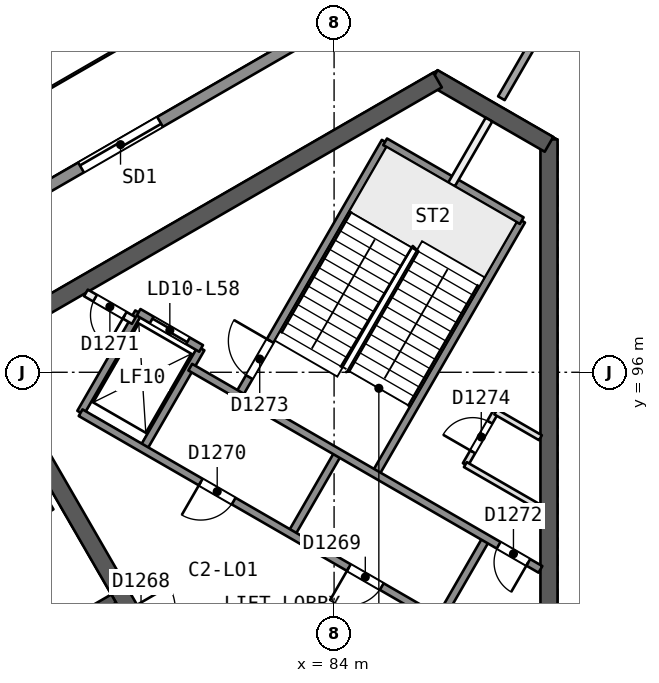
"""IFC4 building model, lengths in metres.
Left out: names, types, materials, properties, quantities, classifications, styles, units other than length and angle.
Written with IfcOpenShell. Run it as: python <this file> out.ifc"""

import sys

from ifc_helpers import new_model, si_unit, direction, frame, frame_2d, origin, place, context, subcontext, project, spatial, rectangle, extrude, element, fill, save


model = new_model("IFC4")
c1 = context("Model", 3, precision=1e-05, world=origin(), true_north=direction((0.0, 1.0)))
c2 = subcontext(c1, "Body", "Model", "MODEL_VIEW")
j1 = project(units=[si_unit("LENGTHUNIT", "METRE"), si_unit("PLANEANGLEUNIT", "RADIAN")], contexts=[c1])
p1 = place(None, origin())
s1 = spatial("IfcSite", under=j1, at=p1, CompositionType="ELEMENT")
p2 = place(p1, origin())
s2 = spatial("IfcBuilding", under=s1, at=p2, CompositionType="ELEMENT")
p3 = place(p2, frame((0.0, 0.0, 235.4)))
s3 = spatial("IfcBuildingStorey", under=s2, at=p3, CompositionType="ELEMENT", Elevation=235.4)
p4 = place(p3, frame((89.655, 88.019, 0.0), z_axis=(0.0, 0.0, 1.0), x_axis=(0.0, 1.0, 0.0)))
e1 = element("IfcWall", 1, at=p4, inside=s3, PredefinedType="SHEAR", context=c2, shape_type="SweptSolid", body=[
    extrude(rectangle(XDim=14.108, YDim=0.45, at=frame_2d((7.054, 0.0))), origin(), (0.0, 0.0, 1.0), 3.7),
])
p5 = place(p3, frame((89.655, 101.998, 0.0), z_axis=(0.0, 0.0, 1.0), x_axis=(-0.866042179588, 0.49997094233, 0.0)))
e2 = element("IfcWall", 2, at=p5, inside=s3, PredefinedType="SHEAR", context=c2, shape_type="SweptSolid", body=[
    extrude(rectangle(XDim=3.515, YDim=0.45, at=frame_2d((1.758, 0.0))), origin(), (0.0, 0.0, 1.0), 3.7),
])
p6 = place(p3, frame((86.723, 103.69, 0.0), z_axis=(0.0, 0.0, 1.0), x_axis=(-0.866022713978, -0.500004658852, 0.0)))
e3 = element("IfcWall", 3, at=p6, inside=s3, PredefinedType="SHEAR", context=c2, shape_type="SweptSolid", body=[
    extrude(rectangle(XDim=14.203, YDim=0.45, at=frame_2d((7.102, 0.0))), origin(), (0.0, 0.0, 1.0), 3.7),
])
p7 = place(p3, frame((74.617, 96.701, 0.0), z_axis=(0.0, 0.0, 1.0), x_axis=(0.499994385119, -0.866028645513, 0.0)))
e4 = element("IfcWall", 4, at=p7, inside=s3, PredefinedType="SHEAR", context=c2, shape_type="SweptSolid", body=[
    extrude(rectangle(XDim=10.155, YDim=0.45, at=frame_2d((5.077, 0.0))), origin(), (0.0, 0.0, 1.0), 3.7),
])
p8 = place(p7, frame((8.005, 0.0, 0.0)))
e5 = element("IfcOpeningElement", 5, at=p8, cuts=e4, PredefinedType="OPENING", context=c2, shape_type="SweptSolid", body=[
    extrude(rectangle(XDim=1.2, YDim=2.1, at=frame_2d((0.6, 1.05))), frame((0.0, 0.235, 0.0), z_axis=(0.0, -1.0, 0.0), x_axis=(1.0, 0.0, 0.0)), (0.0, 0.0, 1.0), 0.471),
])
p9 = place(p3, frame((78.2, 90.046, 0.0), z_axis=(0.0, 0.0, 1.0), x_axis=(-0.866026492143, -0.499998114903, 0.0)))
e6 = element("IfcWall", 6, at=p9, inside=s3, PredefinedType="SHEAR", context=c2, shape_type="SweptSolid", body=[
    extrude(rectangle(XDim=15.588, YDim=0.25, at=frame_2d((7.794, 0.0))), origin(), (0.0, 0.0, 1.0), 3.3),
])
p10 = place(p9, frame((3.294, 0.0, 0.0)))
e7 = element("IfcOpeningElement", 7, at=p10, cuts=e6, PredefinedType="OPENING", context=c2, shape_type="SweptSolid", body=[
    extrude(rectangle(XDim=1.0, YDim=2.1, at=frame_2d((0.5, 1.05))), frame((0.0, 0.135, 0.0), z_axis=(0.0, -1.0, 0.0), x_axis=(1.0, 0.0, 0.0)), (0.0, 0.0, 1.0), 0.271),
])
p11 = place(p9, frame((9.162, 0.0, 0.0)))
e8 = element("IfcOpeningElement", 8, at=p11, cuts=e6, PredefinedType="OPENING", context=c2, shape_type="SweptSolid", body=[
    extrude(rectangle(XDim=1.1, YDim=2.1, at=frame_2d((0.55, 1.05))), frame((0.0, 0.135, 0.0), z_axis=(0.0, -1.0, 0.0), x_axis=(1.0, 0.0, 0.0)), (0.0, 0.0, 1.0), 0.271),
])
p12 = place(p9, frame((11.762, 0.0, 0.0)))
e9 = element("IfcOpeningElement", 9, at=p12, cuts=e6, PredefinedType="OPENING", context=c2, shape_type="SweptSolid", body=[
    extrude(rectangle(XDim=1.0, YDim=2.1, at=frame_2d((0.5, 1.05))), frame((0.0, 0.135, 0.0), z_axis=(0.0, -1.0, 0.0), x_axis=(1.0, 0.0, 0.0)), (0.0, 0.0, 1.0), 0.271),
])
p13 = place(p3, frame((90.069, 106.098, 0.0), z_axis=(0.0, 0.0, 1.0), x_axis=(-0.500005547131, -0.866022201123, 0.0)))
e10 = element("IfcWall", 10, at=p13, inside=s3, PredefinedType="PARTITIONING", context=c2, shape_type="SweptSolid", body=[
    extrude(rectangle(XDim=3.334, YDim=0.2, at=frame_2d((1.667, 0.0))), origin(), (0.0, 0.0, 1.0), 3.3),
])
p14 = place(p3, frame((74.498, 91.257, 0.0), z_axis=(0.0, 0.0, 1.0), x_axis=(0.866038271014, 0.499977712642, 0.0)))
e11 = element("IfcWall", 11, at=p14, inside=s3, PredefinedType="PARTITIONING", context=c2, shape_type="SweptSolid", body=[
    extrude(rectangle(XDim=2.401, YDim=0.15, at=frame_2d((1.2, 0.0))), origin(), (0.0, 0.0, 1.0), 3.3),
])
p15 = place(p3, frame((44.715, 82.552, 0.0), z_axis=(0.0, 0.0, 1.0), x_axis=(0.866025334516, 0.500000119977, 0.0)))
e12 = element("IfcWall", 12, at=p15, inside=s3, PredefinedType="SOLIDWALL", context=c2, shape_type="SweptSolid", body=[
    extrude(rectangle(XDim=49.903, YDim=0.3, at=frame_2d((24.952, 0.0))), origin(), (0.0, 0.0, 1.0), 3.3),
])
p16 = place(p15, frame((23.284, 0.0, 0.0)))
e13 = element("IfcOpeningElement", 13, at=p16, cuts=e12, PredefinedType="OPENING", context=c2, shape_type="SweptSolid", body=[
    extrude(rectangle(XDim=2.4, YDim=2.4, at=frame_2d((1.2, 1.2))), frame((0.0, 0.161, 0.0), z_axis=(0.0, -1.0, 0.0), x_axis=(1.0, 0.0, 0.0)), (0.0, 0.0, 1.0), 0.321),
])
p17 = place(p15, frame((37.674, 0.0, 0.0)))
e14 = element("IfcOpeningElement", 14, at=p17, cuts=e12, PredefinedType="OPENING", context=c2, shape_type="SweptSolid", body=[
    extrude(rectangle(XDim=2.4, YDim=2.4, at=frame_2d((1.2, 1.2))), frame((0.0, 0.161, 0.0), z_axis=(0.0, -1.0, 0.0), x_axis=(1.0, 0.0, 0.0)), (0.0, 0.0, 1.0), 0.321),
])
p18 = place(p15, frame((9.362, 0.0, 0.0)))
e15 = element("IfcOpeningElement", 15, at=p18, cuts=e12, PredefinedType="OPENING", context=c2, shape_type="SweptSolid", body=[
    extrude(rectangle(XDim=2.4, YDim=2.4, at=frame_2d((1.2, 1.2))), frame((0.0, 0.161, 0.0), z_axis=(0.0, -1.0, 0.0), x_axis=(1.0, 0.0, 0.0)), (0.0, 0.0, 1.0), 0.321),
])
p19 = place(p3, frame((86.77, 89.486, 0.0), z_axis=(0.0, 0.0, 1.0), x_axis=(0.499961042966, 0.86604789447, 0.0)))
e16 = element("IfcWall", 16, at=p19, inside=s3, PredefinedType="SOLIDWALL", context=c2, shape_type="SweptSolid", body=[
    extrude(rectangle(XDim=2.48, YDim=0.2, at=frame_2d((1.24, 0.0))), origin(), (0.0, 0.0, 1.0), 3.3),
])
p20 = place(p3, frame((87.454, 93.571, 0.0), z_axis=(0.0, 0.0, 1.0), x_axis=(0.499995408039, 0.866028054938, 0.0)))
e17 = element("IfcWall", 17, at=p20, inside=s3, PredefinedType="PARTITIONING", context=c2, shape_type="SweptSolid", body=[
    extrude(rectangle(XDim=1.6, YDim=0.15, at=frame_2d((0.8, 0.0))), origin(), (0.0, 0.0, 1.0), 3.3),
])
p21 = place(p20, frame((0.387, 0.0, 0.0)))
e18 = element("IfcOpeningElement", 18, at=p21, cuts=e17, PredefinedType="OPENING", context=c2, shape_type="SweptSolid", body=[
    extrude(rectangle(XDim=0.9, YDim=2.1, at=frame_2d((0.45, 1.05))), frame((0.0, 0.085, 0.0), z_axis=(0.0, -1.0, 0.0), x_axis=(1.0, 0.0, 0.0)), (0.0, 0.0, 1.0), 0.171),
])
p22 = place(p3, frame((85.087, 93.321, 0.0), z_axis=(0.0, 0.0, 1.0), x_axis=(0.500019787375, 0.866013979237, 0.0)))
e19 = element("IfcWall", 19, at=p22, inside=s3, PredefinedType="SOLIDWALL", context=c2, shape_type="SweptSolid", body=[
    extrude(rectangle(XDim=7.7, YDim=0.2, at=frame_2d((3.85, 0.0))), origin(), (0.0, 0.0, 1.0), 3.3),
])
p23 = place(p3, frame((82.873, 91.736, 0.0), z_axis=(0.0, 0.0, 1.0), x_axis=(0.499961042966, 0.86604789447, 0.0)))
e20 = element("IfcWall", 20, at=p23, inside=s3, PredefinedType="SOLIDWALL", context=c2, shape_type="SweptSolid", body=[
    extrude(rectangle(XDim=2.48, YDim=0.2, at=frame_2d((1.24, 0.0))), origin(), (0.0, 0.0, 1.0), 3.3),
])
p24 = place(p3, frame((87.09, 100.94, 0.0), z_axis=(0.0, 0.0, 1.0), x_axis=(0.500011643316, 0.866018681408, 0.0)))
e21 = element("IfcWall", 21, at=p24, inside=s3, PredefinedType="PARTITIONING", context=c2, shape_type="SweptSolid", body=[
    extrude(rectangle(XDim=1.973, YDim=0.2, at=frame_2d((0.987, 0.0))), origin(), (0.0, 0.0, 1.0), 3.3),
])
p25 = place(p3, frame((81.493, 95.396, 0.0), z_axis=(0.0, 0.0, 1.0), x_axis=(0.500006057782, 0.866021906294, 0.0)))
e22 = element("IfcWall", 22, at=p25, inside=s3, PredefinedType="SOLIDWALL", context=c2, shape_type="SweptSolid", body=[
    extrude(rectangle(XDim=7.7, YDim=0.2, at=frame_2d((3.85, 0.0))), origin(), (0.0, 0.0, 1.0), 3.3),
])
p26 = place(p25, frame((0.55, 0.0, 0.0)))
e23 = element("IfcOpeningElement", 23, at=p26, cuts=e22, PredefinedType="OPENING", context=c2, shape_type="SweptSolid", body=[
    extrude(rectangle(XDim=1.1, YDim=2.1, at=frame_2d((0.55, 1.05))), frame((0.0, 0.11, 0.0), z_axis=(0.0, -1.0, 0.0), x_axis=(1.0, 0.0, 0.0)), (0.0, 0.0, 1.0), 0.221),
])
for number, where, z_axis, x_axis in (
    (24, (78.976, 93.986, 0.0), (0.0, 0.0, 1.0), (0.5, 0.866, 0.0)),
    (25, (77.33, 94.936, 0.0), (0.0, 0.0, 1.0), (0.5, 0.866, 0.0)),
):
    element("IfcWall", number, at=place(p3, frame(where, z_axis=z_axis, x_axis=x_axis)), inside=s3, PredefinedType="SOLIDWALL", context=c2, shape_type="SweptSolid", body=[
        extrude(rectangle(XDim=3.05, YDim=0.2, at=frame_2d((1.525, 0.0))), origin(), (0.0, 0.0, 1.0), 3.3),
    ])
p27 = place(p3, frame((86.77, 89.486, 0.0), z_axis=(0.0, 0.0, 1.0), x_axis=(-0.86601811187, 0.500012629753, 0.0)))
e26 = element("IfcWall", 26, at=p27, inside=s3, PredefinedType="SOLIDWALL", context=c2, shape_type="SweptSolid", body=[
    extrude(rectangle(XDim=10.9, YDim=0.2, at=frame_2d((5.45, 0.0))), origin(), (0.0, 0.0, 1.0), 3.3),
])
p28 = place(p27, frame((1.75, 0.0, 0.0)))
e27 = element("IfcOpeningElement", 27, at=p28, cuts=e26, PredefinedType="OPENING", context=c2, shape_type="SweptSolid", body=[
    extrude(rectangle(XDim=1.0, YDim=2.1, at=frame_2d((0.5, 1.05))), frame((0.0, 0.11, 0.0), z_axis=(0.0, -1.0, 0.0), x_axis=(1.0, 0.0, 0.0)), (0.0, 0.0, 1.0), 0.221),
])
p29 = place(p27, frame((6.25, 0.0, 0.0)))
e28 = element("IfcOpeningElement", 28, at=p29, cuts=e26, PredefinedType="OPENING", context=c2, shape_type="SweptSolid", body=[
    extrude(rectangle(XDim=1.0, YDim=2.1, at=frame_2d((0.5, 1.05))), frame((0.0, 0.11, 0.0), z_axis=(0.0, -1.0, 0.0), x_axis=(1.0, 0.0, 0.0)), (0.0, 0.0, 1.0), 0.221),
])
p30 = place(p3, frame((89.43, 90.814, 0.0), z_axis=(0.0, 0.0, 1.0), x_axis=(-0.866018983788, 0.500011119594, 0.0)))
e29 = element("IfcWall", 29, at=p30, inside=s3, PredefinedType="SOLIDWALL", context=c2, shape_type="SweptSolid", body=[
    extrude(rectangle(XDim=10.64, YDim=0.2, at=frame_2d((5.32, 0.0))), origin(), (0.0, 0.0, 1.0), 3.3),
])
p31 = place(p30, frame((0.37, 0.0, 0.0)))
e30 = element("IfcOpeningElement", 30, at=p31, cuts=e29, PredefinedType="OPENING", context=c2, shape_type="SweptSolid", body=[
    extrude(rectangle(XDim=0.9, YDim=2.1, at=frame_2d((0.45, 1.05))), frame((0.0, 0.11, 0.0), z_axis=(0.0, -1.0, 0.0), x_axis=(1.0, 0.0, 0.0)), (0.0, 0.0, 1.0), 0.221),
])
p32 = place(p3, frame((78.73, 97.361, 0.0), z_axis=(0.0, 0.0, 1.0), x_axis=(-0.866045896294, 0.499964504253, 0.0)))
e31 = element("IfcWall", 31, at=p32, inside=s3, PredefinedType="PARTITIONING", context=c2, shape_type="SweptSolid", body=[
    extrude(rectangle(XDim=1.455, YDim=0.2, at=frame_2d((0.728, 0.0))), origin(), (0.0, 0.0, 1.0), 3.3),
])
p33 = place(p32, frame((0.278, 0.0, 0.0)))
e32 = element("IfcOpeningElement", 32, at=p33, cuts=e31, PredefinedType="OPENING", context=c2, shape_type="SweptSolid", body=[
    extrude(rectangle(XDim=0.9, YDim=2.1, at=frame_2d((0.45, 1.05))), frame((0.0, 0.11, 0.0), z_axis=(0.0, -1.0, 0.0), x_axis=(1.0, 0.0, 0.0)), (0.0, 0.0, 1.0), 0.221),
])
p34 = place(p3, frame((80.5, 96.627, 0.0), z_axis=(0.0, 0.0, 1.0), x_axis=(-0.86601224135, 0.500022797313, 0.0)))
e33 = element("IfcWall", 33, at=p34, inside=s3, PredefinedType="SOLIDWALL", context=c2, shape_type="SweptSolid", body=[
    extrude(rectangle(XDim=1.9, YDim=0.2, at=frame_2d((0.95, 0.0))), origin(), (0.0, 0.0, 1.0), 3.3),
])
p35 = place(p34, frame((0.4, 0.0, 0.0)))
e34 = element("IfcOpeningElement", 34, at=p35, cuts=e33, PredefinedType="OPENING", context=c2, shape_type="SweptSolid", body=[
    extrude(rectangle(XDim=1.1, YDim=2.1, at=frame_2d((0.55, 1.05))), frame((0.0, 0.11, 0.0), z_axis=(0.0, -1.0, 0.0), x_axis=(1.0, 0.0, 0.0)), (0.0, 0.0, 1.0), 0.221),
])
p36 = place(p3, frame((89.43, 92.43, 0.0), z_axis=(0.0, 0.0, 1.0), x_axis=(-0.866048373726, 0.499960212783, 0.0)))
e35 = element("IfcWall", 35, at=p36, inside=s3, PredefinedType="PARTITIONING", context=c2, shape_type="SweptSolid", body=[
    extrude(rectangle(XDim=2.281, YDim=0.15, at=frame_2d((1.141, 0.0))), origin(), (0.0, 0.0, 1.0), 3.3),
])
p37 = place(p3, frame((89.43, 94.278, 0.0), z_axis=(0.0, 0.0, 1.0), x_axis=(-0.865987941628, 0.500064880745, 0.0)))
e36 = element("IfcWall", 36, at=p37, inside=s3, PredefinedType="PARTITIONING", context=c2, shape_type="SweptSolid", body=[
    extrude(rectangle(XDim=1.358, YDim=0.15, at=frame_2d((0.679, 0.0))), origin(), (0.0, 0.0, 1.0), 3.3),
])
p38 = place(p3, frame((88.937, 99.99, 0.0), z_axis=(0.0, 0.0, 1.0), x_axis=(-0.866004344652, 0.500036473714, 0.0)))
e37 = element("IfcWall", 37, at=p38, inside=s3, PredefinedType="SOLIDWALL", context=c2, shape_type="SweptSolid", body=[
    extrude(rectangle(XDim=4.15, YDim=0.2, at=frame_2d((2.075, 0.0))), origin(), (0.0, 0.0, 1.0), 3.3),
])
p39 = place(p17, origin())
e38 = element("IfcDoor", 38, at=p39, inside=s3, OperationType="SLIDING_TO_RIGHT", PredefinedType="NOTDEFINED", context=c2, shape_type="SweptSolid", body=[
    extrude(rectangle(XDim=2.4, YDim=2.4, at=frame_2d((1.2, 1.2))), frame((0.0, 0.025, 0.0), z_axis=(0.0, -1.0, 0.0), x_axis=(1.0, 0.0, 0.0)), (0.0, 0.0, 1.0), 0.05),
])
fill(e14, e38)
p40 = place(p35, origin())
e39 = element("IfcDoor", 39, at=p40, inside=s3, OperationType="SLIDING_TO_RIGHT", PredefinedType="NOTDEFINED", context=c2, shape_type="SweptSolid", body=[
    extrude(rectangle(XDim=1.1, YDim=2.1, at=frame_2d((0.55, 1.05))), frame((0.0, 0.025, 0.0), z_axis=(0.0, -1.0, 0.0), x_axis=(1.0, 0.0, 0.0)), (0.0, 0.0, 1.0), 0.05),
])
fill(e34, e39)
p41 = place(p28, origin())
e40 = element("IfcDoor", 40, at=p41, inside=s3, OperationType="SINGLE_SWING_RIGHT", PredefinedType="NOTDEFINED", context=c2, shape_type="SweptSolid", body=[
    extrude(rectangle(XDim=1.0, YDim=2.1, at=frame_2d((0.5, 1.05))), frame((0.0, 0.025, 0.0), z_axis=(0.0, -1.0, 0.0), x_axis=(1.0, 0.0, 0.0)), (0.0, 0.0, 1.0), 0.05),
])
fill(e27, e40)
p42 = place(p29, origin())
e41 = element("IfcDoor", 41, at=p42, inside=s3, OperationType="SINGLE_SWING_RIGHT", PredefinedType="NOTDEFINED", context=c2, shape_type="SweptSolid", body=[
    extrude(rectangle(XDim=1.0, YDim=2.1, at=frame_2d((0.5, 1.05))), frame((0.0, 0.025, 0.0), z_axis=(0.0, -1.0, 0.0), x_axis=(1.0, 0.0, 0.0)), (0.0, 0.0, 1.0), 0.05),
])
fill(e28, e41)
p43 = place(p33, origin())
e42 = element("IfcDoor", 42, at=p43, inside=s3, OperationType="SINGLE_SWING_LEFT", PredefinedType="NOTDEFINED", context=c2, shape_type="SweptSolid", body=[
    extrude(rectangle(XDim=0.9, YDim=2.1, at=frame_2d((0.45, 1.05))), frame((0.0, 0.025, 0.0), z_axis=(0.0, -1.0, 0.0), x_axis=(1.0, 0.0, 0.0)), (0.0, 0.0, 1.0), 0.05),
])
fill(e32, e42)
p44 = place(p31, origin())
e43 = element("IfcDoor", 43, at=p44, inside=s3, OperationType="SINGLE_SWING_LEFT", PredefinedType="NOTDEFINED", context=c2, shape_type="SweptSolid", body=[
    extrude(rectangle(XDim=0.9, YDim=2.1, at=frame_2d((0.45, 1.05))), frame((0.0, 0.025, 0.0), z_axis=(0.0, -1.0, 0.0), x_axis=(1.0, 0.0, 0.0)), (0.0, 0.0, 1.0), 0.05),
])
fill(e30, e43)
p45 = place(p26, origin())
e44 = element("IfcDoor", 44, at=p45, inside=s3, OperationType="SINGLE_SWING_RIGHT", PredefinedType="NOTDEFINED", context=c2, shape_type="SweptSolid", body=[
    extrude(rectangle(XDim=1.1, YDim=2.1, at=frame_2d((0.55, 1.05))), frame((0.0, 0.025, 0.0), z_axis=(0.0, -1.0, 0.0), x_axis=(1.0, 0.0, 0.0)), (0.0, 0.0, 1.0), 0.05),
])
fill(e23, e44)
p46 = place(p21, origin())
e45 = element("IfcDoor", 45, at=p46, inside=s3, OperationType="SINGLE_SWING_LEFT", PredefinedType="NOTDEFINED", context=c2, shape_type="SweptSolid", body=[
    extrude(rectangle(XDim=0.9, YDim=2.1, at=frame_2d((0.45, 1.05))), frame((0.0, 0.025, 0.0), z_axis=(0.0, -1.0, 0.0), x_axis=(1.0, 0.0, 0.0)), (0.0, 0.0, 1.0), 0.05),
])
fill(e18, e45)
save(model, sys.argv[1])
